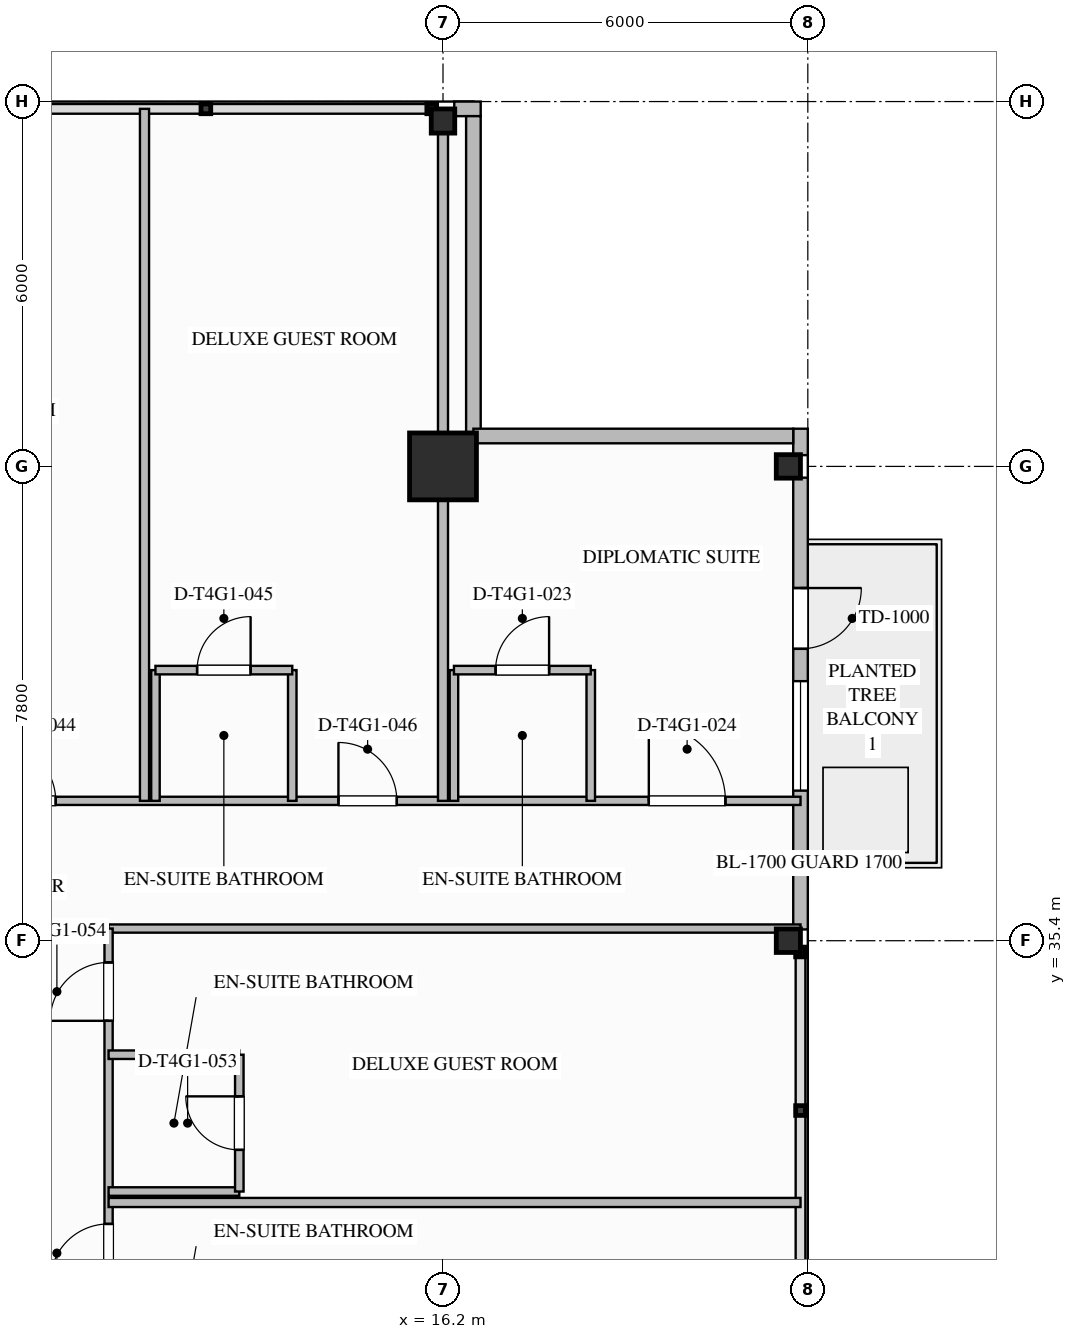
"""IFC4 building model, lengths in metres.
Left out: names, types, materials, properties, quantities, classifications, styles, units other than length and angle.
Written with IfcOpenShell. Run it as: python <this file> out.ifc"""

import sys

from ifc_helpers import new_model, si_unit, direction, frame, frame_2d, origin, origin_2d, place, context, subcontext, project, spatial, rectangle, i_section, extrude, element, fill, save


model = new_model("IFC4")
c1 = context("Model", 3, precision=1e-05, world=origin(), true_north=direction((0.0, 1.0)))
c2 = subcontext(c1, "Body", "Model", "MODEL_VIEW")
j1 = project(units=[si_unit("LENGTHUNIT", "METRE"), si_unit("PLANEANGLEUNIT", "RADIAN")], contexts=[c1])
p1 = place(None, origin())
s1 = spatial("IfcSite", under=j1, at=p1, CompositionType="ELEMENT")
p2 = place(p1, origin())
s2 = spatial("IfcBuilding", under=s1, at=p2, CompositionType="ELEMENT")
p3 = place(p2, frame((0.0, 0.0, 208.7)))
s3 = spatial("IfcBuildingStorey", under=s2, at=p3, CompositionType="ELEMENT", Elevation=208.7)
p4 = place(p3, frame((16.2, 43.2, 0.0), z_axis=(0.0, 0.0, 1.0), x_axis=(1.0, 0.0, 0.0)))
e1 = element("IfcColumn", 1, at=p4, inside=s3, PredefinedType="COLUMN", context=c2, shape_type="SweptSolid", body=[
    extrude(rectangle(XDim=1.1, YDim=1.1, at=origin_2d()), origin(), (0.0, 0.0, 1.0), 3.6),
])
for number, where, z_axis, x_axis in (
    (2, (21.88, 35.4, 0.0), (0.0, 0.0, 1.0), (1.0, 0.0, 0.0)),
    (3, (21.88, 43.2, 0.0), (0.0, 0.0, 1.0), (1.0, 0.0, 0.0)),
    (4, (16.2, 48.88, 0.0), (0.0, 0.0, 1.0), (0.0, 1.0, 0.0)),
):
    element("IfcColumn", number, at=place(p3, frame(where, z_axis=z_axis, x_axis=x_axis)), inside=s3, PredefinedType="COLUMN", context=c2, shape_type="SweptSolid", body=[
        extrude(i_section(OverallWidth=0.397, OverallDepth=0.387, WebThickness=0.021, FlangeThickness=0.033, FilletRadius=0.025, at=origin_2d()), origin(), (0.0, 0.0, 1.0), 3.597),
    ])
p5 = place(p3, frame((22.08, 43.015, 0.0), z_axis=(0.0, 0.0, 1.0), x_axis=(0.0, -1.0, 0.0)))
e5 = element("IfcWall", 5, at=p5, inside=s3, PredefinedType="STANDARD", context=c2, shape_type="SweptSolid", body=[
    extrude(rectangle(XDim=7.429, YDim=0.24, at=frame_2d((3.715, 0.0))), origin(), (0.0, 0.0, 1.0), 2.803),
])
p6 = place(p5, frame((1.815, 0.0, 0.0)))
e6 = element("IfcOpeningElement", 6, at=p6, cuts=e5, PredefinedType="OPENING", context=c2, shape_type="SweptSolid", body=[
    extrude(rectangle(XDim=1.0, YDim=2.2, at=frame_2d((0.5, 1.1))), frame((0.0, 0.13, 0.0), z_axis=(0.0, -1.0, 0.0), x_axis=(1.0, 0.0, 0.0)), (0.0, 0.0, 1.0), 0.26),
])
p7 = place(p5, frame((3.346, 0.0, 0.75)))
e7 = element("IfcOpeningElement", 7, at=p7, cuts=e5, PredefinedType="OPENING", context=c2, shape_type="SweptSolid", body=[
    extrude(rectangle(XDim=1.8, YDim=1.953, at=frame_2d((0.9, 0.977))), frame((0.0, 0.13, 0.0), z_axis=(0.0, -1.0, 0.0), x_axis=(1.0, 0.0, 0.0)), (0.0, 0.0, 1.0), 0.26),
])
for number, where, z_axis, x_axis in (
    (8, (22.08, 43.82, 0.0), (0.0, 0.0, 1.0), (0.0, -1.0, 0.0)),
    (9, (16.385, 49.08, 0.0), (0.0, 0.0, 1.0), (1.0, 0.0, 0.0)),
):
    element("IfcWall", number, at=place(p3, frame(where, z_axis=z_axis, x_axis=x_axis)), inside=s3, PredefinedType="STANDARD", context=c2, shape_type="SweptSolid", body=[
        extrude(rectangle(XDim=0.435, YDim=0.24, at=frame_2d((0.217, 0.0))), origin(), (0.0, 0.0, 1.0), 3.34),
    ])
for number, where, z_axis, x_axis in (
    (10, (16.7, 48.96, 0.0), (0.0, 0.0, 1.0), (0.0, -1.0, 0.0)),
    (11, (16.7, 43.7, 0.0), (0.0, 0.0, 1.0), (1.0, 0.0, 0.0)),
):
    element("IfcWall", number, at=place(p3, frame(where, z_axis=z_axis, x_axis=x_axis)), inside=s3, PredefinedType="STANDARD", context=c2, shape_type="SweptSolid", body=[
        extrude(rectangle(XDim=5.26, YDim=0.24, at=frame_2d((2.63, 0.0))), origin(), (0.0, 0.0, 1.0), 3.34),
    ])
p8 = place(p3, frame((-16.2, 37.7, 0.0), z_axis=(0.0, 0.0, 1.0), x_axis=(1.0, 0.0, 0.0)))
e12 = element("IfcWall", 12, at=p8, inside=s3, PredefinedType="PARTITIONING", context=c2, shape_type="SweptSolid", body=[
    extrude(rectangle(XDim=38.28, YDim=0.135, at=frame_2d((19.14, 0.0))), origin(), (0.0, 0.0, 1.0), 3.34),
])
p9 = place(p8, frame((35.785, 0.0, 0.0)))
e13 = element("IfcOpeningElement", 13, at=p9, cuts=e12, PredefinedType="OPENING", context=c2, shape_type="SweptSolid", body=[
    extrude(rectangle(XDim=1.26, YDim=2.2, at=frame_2d((0.63, 1.1))), frame((0.0, 0.077, 0.0), z_axis=(0.0, -1.0, 0.0), x_axis=(1.0, 0.0, 0.0)), (0.0, 0.0, 1.0), 0.155),
])
p10 = place(p8, frame((3.189, 0.0, 0.0)))
e14 = element("IfcOpeningElement", 14, at=p10, cuts=e12, PredefinedType="OPENING", context=c2, shape_type="SweptSolid", body=[
    extrude(rectangle(XDim=0.96, YDim=2.15, at=frame_2d((0.48, 1.075))), frame((0.0, 0.077, 0.0), z_axis=(0.0, -1.0, 0.0), x_axis=(1.0, 0.0, 0.0)), (0.0, 0.0, 1.0), 0.155),
])
p11 = place(p8, frame((8.379, 0.0, 0.0)))
e15 = element("IfcOpeningElement", 15, at=p11, cuts=e12, PredefinedType="OPENING", context=c2, shape_type="SweptSolid", body=[
    extrude(rectangle(XDim=0.96, YDim=2.15, at=frame_2d((0.48, 1.075))), frame((0.0, 0.077, 0.0), z_axis=(0.0, -1.0, 0.0), x_axis=(1.0, 0.0, 0.0)), (0.0, 0.0, 1.0), 0.155),
])
p12 = place(p8, frame((14.025, 0.0, 0.0)))
e16 = element("IfcOpeningElement", 16, at=p12, cuts=e12, PredefinedType="OPENING", context=c2, shape_type="SweptSolid", body=[
    extrude(rectangle(XDim=0.96, YDim=2.15, at=frame_2d((0.48, 1.075))), frame((0.0, 0.077, 0.0), z_axis=(0.0, -1.0, 0.0), x_axis=(1.0, 0.0, 0.0)), (0.0, 0.0, 1.0), 0.155),
])
p13 = place(p8, frame((18.18, 0.0, 0.0)))
e17 = element("IfcOpeningElement", 17, at=p13, cuts=e12, PredefinedType="OPENING", context=c2, shape_type="SweptSolid", body=[
    extrude(rectangle(XDim=1.02, YDim=2.15, at=frame_2d((0.51, 1.075))), frame((0.0, 0.077, 0.0), z_axis=(0.0, -1.0, 0.0), x_axis=(1.0, 0.0, 0.0)), (0.0, 0.0, 1.0), 0.155),
])
p14 = place(p8, frame((25.071, 0.0, 0.0)))
e18 = element("IfcOpeningElement", 18, at=p14, cuts=e12, PredefinedType="OPENING", context=c2, shape_type="SweptSolid", body=[
    extrude(rectangle(XDim=0.96, YDim=2.15, at=frame_2d((0.48, 1.075))), frame((0.0, 0.077, 0.0), z_axis=(0.0, -1.0, 0.0), x_axis=(1.0, 0.0, 0.0)), (0.0, 0.0, 1.0), 0.155),
])
p15 = place(p8, frame((30.68, 0.0, 0.0)))
e19 = element("IfcOpeningElement", 19, at=p15, cuts=e12, PredefinedType="OPENING", context=c2, shape_type="SweptSolid", body=[
    extrude(rectangle(XDim=0.96, YDim=2.15, at=frame_2d((0.48, 1.075))), frame((0.0, 0.077, 0.0), z_axis=(0.0, -1.0, 0.0), x_axis=(1.0, 0.0, 0.0)), (0.0, 0.0, 1.0), 0.155),
])
p16 = place(p3, frame((10.7, 35.6, 0.0), z_axis=(0.0, 0.0, 1.0), x_axis=(1.0, 0.0, 0.0)))
e20 = element("IfcWall", 20, at=p16, inside=s3, PredefinedType="PARTITIONING", context=c2, shape_type="SweptSolid", body=[
    extrude(rectangle(XDim=11.38, YDim=0.135, at=frame_2d((5.69, 0.0))), origin(), (0.0, 0.0, 1.0), 2.718),
])
p17 = place(p3, frame((10.7, 18.4, 0.0), z_axis=(0.0, 0.0, 1.0), x_axis=(0.0, 1.0, 0.0)))
e21 = element("IfcWall", 21, at=p17, inside=s3, PredefinedType="PARTITIONING", context=c2, shape_type="SweptSolid", body=[
    extrude(rectangle(XDim=17.2, YDim=0.135, at=frame_2d((8.6, 0.0))), origin(), (0.0, 0.0, 1.0), 3.34),
])
p18 = place(p17, frame((2.987, 0.0, 0.0)))
e22 = element("IfcOpeningElement", 22, at=p18, cuts=e21, PredefinedType="OPENING", context=c2, shape_type="SweptSolid", body=[
    extrude(rectangle(XDim=0.96, YDim=2.15, at=frame_2d((0.48, 1.075))), frame((0.0, 0.077, 0.0), z_axis=(0.0, -1.0, 0.0), x_axis=(1.0, 0.0, 0.0)), (0.0, 0.0, 1.0), 0.155),
])
p19 = place(p17, frame((7.287, 0.0, 0.0)))
e23 = element("IfcOpeningElement", 23, at=p19, cuts=e21, PredefinedType="OPENING", context=c2, shape_type="SweptSolid", body=[
    extrude(rectangle(XDim=0.96, YDim=2.15, at=frame_2d((0.48, 1.075))), frame((0.0, 0.077, 0.0), z_axis=(0.0, -1.0, 0.0), x_axis=(1.0, 0.0, 0.0)), (0.0, 0.0, 1.0), 0.155),
])
p20 = place(p17, frame((11.383, 0.0, 0.0)))
e24 = element("IfcOpeningElement", 24, at=p20, cuts=e21, PredefinedType="OPENING", context=c2, shape_type="SweptSolid", body=[
    extrude(rectangle(XDim=0.96, YDim=2.15, at=frame_2d((0.48, 1.075))), frame((0.0, 0.077, 0.0), z_axis=(0.0, -1.0, 0.0), x_axis=(1.0, 0.0, 0.0)), (0.0, 0.0, 1.0), 0.155),
])
p21 = place(p17, frame((15.683, 0.0, 0.0)))
e25 = element("IfcOpeningElement", 25, at=p21, cuts=e21, PredefinedType="OPENING", context=c2, shape_type="SweptSolid", body=[
    extrude(rectangle(XDim=0.96, YDim=2.15, at=frame_2d((0.48, 1.075))), frame((0.0, 0.077, 0.0), z_axis=(0.0, -1.0, 0.0), x_axis=(1.0, 0.0, 0.0)), (0.0, 0.0, 1.0), 0.155),
])
p22 = place(p3, frame((16.2, 37.7, 0.0), z_axis=(0.0, 0.0, 1.0), x_axis=(0.0, 1.0, 0.0)))
e26 = element("IfcWall", 26, at=p22, inside=s3, PredefinedType="PARTITIONING", context=c2, shape_type="SweptSolid", body=[
    extrude(rectangle(XDim=11.38, YDim=0.165, at=frame_2d((5.69, 0.0))), origin(), (0.0, 0.0, 1.0), 2.714),
])
p23 = place(p3, frame((16.38, 37.7, 0.0), z_axis=(0.0, 0.0, 1.0), x_axis=(0.0, 1.0, 0.0)))
e27 = element("IfcWall", 27, at=p23, inside=s3, PredefinedType="PLUMBINGWALL", context=c2, shape_type="SweptSolid", body=[
    extrude(rectangle(XDim=2.15, YDim=0.14, at=frame_2d((1.075, 0.0))), origin(), (0.0, 0.0, 1.0), 2.714),
])
p24 = place(p3, frame((18.63, 37.7, 0.0), z_axis=(0.0, 0.0, 1.0), x_axis=(0.0, 1.0, 0.0)))
e28 = element("IfcWall", 28, at=p24, inside=s3, PredefinedType="PLUMBINGWALL", context=c2, shape_type="SweptSolid", body=[
    extrude(rectangle(XDim=2.15, YDim=0.14, at=frame_2d((1.075, 0.0))), origin(), (0.0, 0.0, 1.0), 3.34),
])
p25 = place(p3, frame((16.38, 39.85, 0.0), z_axis=(0.0, 0.0, 1.0), x_axis=(1.0, 0.0, 0.0)))
e29 = element("IfcWall", 29, at=p25, inside=s3, PredefinedType="PLUMBINGWALL", context=c2, shape_type="SweptSolid", body=[
    extrude(rectangle(XDim=2.25, YDim=0.14, at=frame_2d((1.125, 0.0))), origin(), (0.0, 0.0, 1.0), 3.34),
])
p26 = place(p25, frame((0.685, 0.0, 0.0)))
e30 = element("IfcOpeningElement", 30, at=p26, cuts=e29, PredefinedType="OPENING", context=c2, shape_type="SweptSolid", body=[
    extrude(rectangle(XDim=0.88, YDim=2.1, at=frame_2d((0.44, 1.05))), frame((0.0, 0.08, 0.0), z_axis=(0.0, -1.0, 0.0), x_axis=(1.0, 0.0, 0.0)), (0.0, 0.0, 1.0), 0.16),
])
p27 = place(p3, frame((11.291, 37.7, 0.0), z_axis=(0.0, 0.0, 1.0), x_axis=(0.0, 1.0, 0.0)))
e31 = element("IfcWall", 31, at=p27, inside=s3, PredefinedType="PARTITIONING", context=c2, shape_type="SweptSolid", body=[
    extrude(rectangle(XDim=11.38, YDim=0.15, at=frame_2d((5.69, 0.0))), origin(), (0.0, 0.0, 1.0), 3.34),
])
for number, where, z_axis, x_axis in (
    (32, (11.471, 37.7, 0.0), (0.0, 0.0, 1.0), (0.0, 1.0, 0.0)),
    (33, (13.721, 37.7, 0.0), (0.0, 0.0, 1.0), (0.0, 1.0, 0.0)),
):
    element("IfcWall", number, at=place(p3, frame(where, z_axis=z_axis, x_axis=x_axis)), inside=s3, PredefinedType="PLUMBINGWALL", context=c2, shape_type="SweptSolid", body=[
        extrude(rectangle(XDim=2.15, YDim=0.14, at=frame_2d((1.075, 0.0))), origin(), (0.0, 0.0, 1.0), 3.34),
    ])
p28 = place(p3, frame((11.471, 39.85, 0.0), z_axis=(0.0, 0.0, 1.0), x_axis=(1.0, 0.0, 0.0)))
e34 = element("IfcWall", 34, at=p28, inside=s3, PredefinedType="PLUMBINGWALL", context=c2, shape_type="SweptSolid", body=[
    extrude(rectangle(XDim=2.25, YDim=0.14, at=frame_2d((1.125, 0.0))), origin(), (0.0, 0.0, 1.0), 3.34),
])
p29 = place(p28, frame((0.685, 0.0, 0.0)))
e35 = element("IfcOpeningElement", 35, at=p29, cuts=e34, PredefinedType="OPENING", context=c2, shape_type="SweptSolid", body=[
    extrude(rectangle(XDim=0.88, YDim=2.1, at=frame_2d((0.44, 1.05))), frame((0.0, 0.08, 0.0), z_axis=(0.0, -1.0, 0.0), x_axis=(1.0, 0.0, 0.0)), (0.0, 0.0, 1.0), 0.16),
])
p30 = place(p3, frame((10.7, 31.095, 0.0), z_axis=(0.0, 0.0, 1.0), x_axis=(1.0, 0.0, 0.0)))
e36 = element("IfcWall", 36, at=p30, inside=s3, PredefinedType="PARTITIONING", context=c2, shape_type="SweptSolid", body=[
    extrude(rectangle(XDim=11.38, YDim=0.15, at=frame_2d((5.69, 0.0))), origin(), (0.0, 0.0, 1.0), 3.34),
])
for number, where, z_axis, x_axis in (
    (37, (10.7, 31.275, 0.0), (0.0, 0.0, 1.0), (1.0, 0.0, 0.0)),
    (38, (10.7, 33.525, 0.0), (0.0, 0.0, 1.0), (1.0, 0.0, 0.0)),
):
    element("IfcWall", number, at=place(p3, frame(where, z_axis=z_axis, x_axis=x_axis)), inside=s3, PredefinedType="PLUMBINGWALL", context=c2, shape_type="SweptSolid", body=[
        extrude(rectangle(XDim=2.15, YDim=0.14, at=frame_2d((1.075, 0.0))), origin(), (0.0, 0.0, 1.0), 3.34),
    ])
p31 = place(p3, frame((12.85, 31.275, 0.0), z_axis=(0.0, 0.0, 1.0), x_axis=(0.0, 1.0, 0.0)))
e39 = element("IfcWall", 39, at=p31, inside=s3, PredefinedType="PLUMBINGWALL", context=c2, shape_type="SweptSolid", body=[
    extrude(rectangle(XDim=2.25, YDim=0.14, at=frame_2d((1.125, 0.0))), origin(), (0.0, 0.0, 1.0), 3.34),
])
p32 = place(p31, frame((0.685, 0.0, 0.0)))
e40 = element("IfcOpeningElement", 40, at=p32, cuts=e39, PredefinedType="OPENING", context=c2, shape_type="SweptSolid", body=[
    extrude(rectangle(XDim=0.88, YDim=2.1, at=frame_2d((0.44, 1.05))), frame((0.0, 0.08, 0.0), z_axis=(0.0, -1.0, 0.0), x_axis=(1.0, 0.0, 0.0)), (0.0, 0.0, 1.0), 0.16),
])
p33 = place(p6, origin())
e41 = element("IfcDoor", 41, at=p33, inside=s3, OperationType="SINGLE_SWING_LEFT", PredefinedType="DOOR", context=c2, shape_type="SweptSolid", body=[
    extrude(rectangle(XDim=1.0, YDim=2.2, at=frame_2d((0.5, 1.1))), frame((0.0, 0.025, 0.0), z_axis=(0.0, -1.0, 0.0), x_axis=(1.0, 0.0, 0.0)), (0.0, 0.0, 1.0), 0.05),
])
fill(e6, e41)
p34 = place(p7, origin())
e42 = element("IfcWindow", 42, at=p34, inside=s3, PartitioningType="SINGLE_PANEL", PredefinedType="WINDOW", context=c2, shape_type="SweptSolid", body=[
    extrude(rectangle(XDim=1.8, YDim=1.953, at=frame_2d((0.9, 0.977))), frame((0.0, 0.03, 0.0), z_axis=(0.0, -1.0, 0.0), x_axis=(1.0, 0.0, 0.0)), (0.0, 0.0, 1.0), 0.06),
])
fill(e7, e42)
p35 = place(p26, origin())
e43 = element("IfcDoor", 43, at=p35, inside=s3, OperationType="SINGLE_SWING_RIGHT", PredefinedType="DOOR", context=c2, shape_type="SweptSolid", body=[
    extrude(rectangle(XDim=0.88, YDim=2.1, at=frame_2d((0.44, 1.05))), frame((0.0, 0.025, 0.0), z_axis=(0.0, -1.0, 0.0), x_axis=(1.0, 0.0, 0.0)), (0.0, 0.0, 1.0), 0.05),
])
fill(e30, e43)
p36 = place(p9, origin())
e44 = element("IfcDoor", 44, at=p36, inside=s3, OperationType="SINGLE_SWING_LEFT", PredefinedType="DOOR", context=c2, shape_type="SweptSolid", body=[
    extrude(rectangle(XDim=1.26, YDim=2.2, at=frame_2d((0.63, 1.1))), frame((0.0, 0.025, 0.0), z_axis=(0.0, -1.0, 0.0), x_axis=(1.0, 0.0, 0.0)), (0.0, 0.0, 1.0), 0.05),
])
fill(e13, e44)
p37 = place(p14, origin())
e45 = element("IfcDoor", 45, at=p37, inside=s3, OperationType="SINGLE_SWING_LEFT", PredefinedType="DOOR", context=c2, shape_type="SweptSolid", body=[
    extrude(rectangle(XDim=0.96, YDim=2.15, at=frame_2d((0.48, 1.075))), frame((0.0, 0.025, 0.0), z_axis=(0.0, -1.0, 0.0), x_axis=(1.0, 0.0, 0.0)), (0.0, 0.0, 1.0), 0.05),
])
fill(e18, e45)
p38 = place(p29, origin())
e46 = element("IfcDoor", 46, at=p38, inside=s3, OperationType="SINGLE_SWING_RIGHT", PredefinedType="DOOR", context=c2, shape_type="SweptSolid", body=[
    extrude(rectangle(XDim=0.88, YDim=2.1, at=frame_2d((0.44, 1.05))), frame((0.0, 0.025, 0.0), z_axis=(0.0, -1.0, 0.0), x_axis=(1.0, 0.0, 0.0)), (0.0, 0.0, 1.0), 0.05),
])
fill(e35, e46)
p39 = place(p15, origin())
e47 = element("IfcDoor", 47, at=p39, inside=s3, OperationType="SINGLE_SWING_LEFT", PredefinedType="DOOR", context=c2, shape_type="SweptSolid", body=[
    extrude(rectangle(XDim=0.96, YDim=2.15, at=frame_2d((0.48, 1.075))), frame((0.0, 0.025, 0.0), z_axis=(0.0, -1.0, 0.0), x_axis=(1.0, 0.0, 0.0)), (0.0, 0.0, 1.0), 0.05),
])
fill(e19, e47)
p40 = place(p20, origin())
e48 = element("IfcDoor", 48, at=p40, inside=s3, OperationType="SINGLE_SWING_LEFT", PredefinedType="DOOR", context=c2, shape_type="SweptSolid", body=[
    extrude(rectangle(XDim=0.96, YDim=2.15, at=frame_2d((0.48, 1.075))), frame((0.0, 0.025, 0.0), z_axis=(0.0, -1.0, 0.0), x_axis=(1.0, 0.0, 0.0)), (0.0, 0.0, 1.0), 0.05),
])
fill(e24, e48)
p41 = place(p32, origin())
e49 = element("IfcDoor", 49, at=p41, inside=s3, OperationType="SINGLE_SWING_RIGHT", PredefinedType="DOOR", context=c2, shape_type="SweptSolid", body=[
    extrude(rectangle(XDim=0.88, YDim=2.1, at=frame_2d((0.44, 1.05))), frame((0.0, 0.025, 0.0), z_axis=(0.0, -1.0, 0.0), x_axis=(1.0, 0.0, 0.0)), (0.0, 0.0, 1.0), 0.05),
])
fill(e40, e49)
p42 = place(p21, origin())
e50 = element("IfcDoor", 50, at=p42, inside=s3, OperationType="SINGLE_SWING_LEFT", PredefinedType="DOOR", context=c2, shape_type="SweptSolid", body=[
    extrude(rectangle(XDim=0.96, YDim=2.15, at=frame_2d((0.48, 1.075))), frame((0.0, 0.025, 0.0), z_axis=(0.0, -1.0, 0.0), x_axis=(1.0, 0.0, 0.0)), (0.0, 0.0, 1.0), 0.05),
])
fill(e25, e50)
save(model, sys.argv[1])
